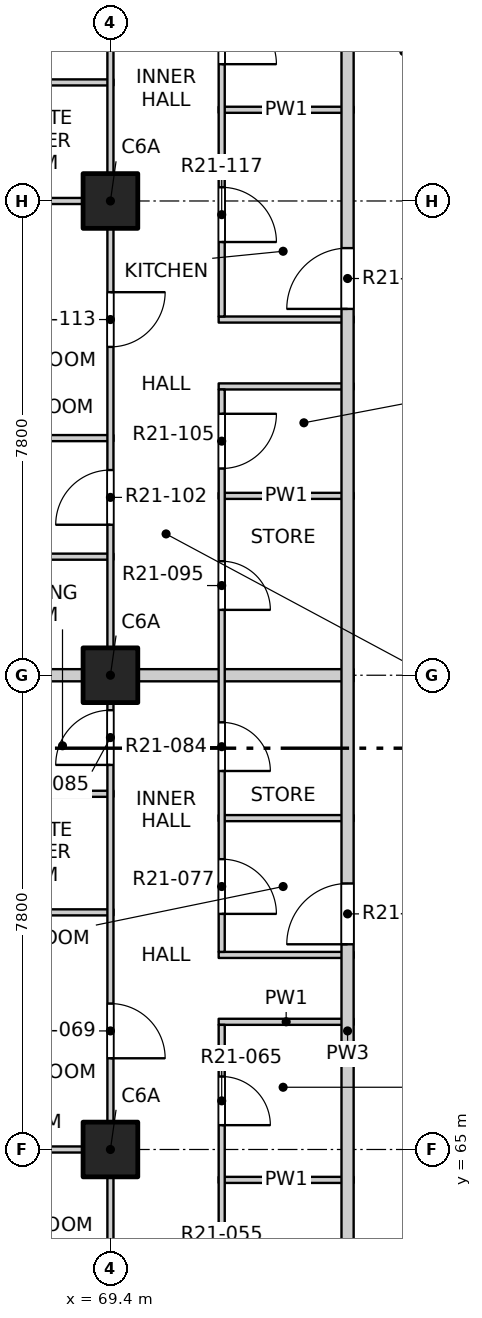
"""IFC4 building model, lengths in metres.
Left out: names, types, materials, properties, quantities, classifications, styles, units other than length and angle.
Written with IfcOpenShell. Run it as: python <this file> out.ifc"""

import sys

from ifc_helpers import new_model, si_unit, direction, frame, frame_2d, origin, origin_2d, place, context, subcontext, project, spatial, rectangle, extrude, element, fill, save


model = new_model("IFC4")
c1 = context("Model", 3, precision=1e-05, world=origin(), true_north=direction((0.0, 1.0)))
c2 = subcontext(c1, "Body", "Model", "MODEL_VIEW")
j1 = project(units=[si_unit("LENGTHUNIT", "METRE"), si_unit("PLANEANGLEUNIT", "RADIAN")], contexts=[c1])
p1 = place(None, origin())
s1 = spatial("IfcSite", under=j1, at=p1, CompositionType="ELEMENT")
p2 = place(p1, origin())
s2 = spatial("IfcBuilding", under=s1, at=p2, CompositionType="ELEMENT")
p3 = place(p2, frame((0.0, 0.0, 214.3)))
s3 = spatial("IfcBuildingStorey", under=s2, at=p3, CompositionType="ELEMENT", Elevation=214.3)
for number, where, z_axis, x_axis in (
    (1, (69.4, 65.0, -0.25), (0.0, 0.0, 1.0), (1.0, 0.0, 0.0)),
    (2, (69.4, 72.8, -0.25), (0.0, 0.0, 1.0), (1.0, 0.0, 0.0)),
    (3, (69.4, 80.6, -0.25), (0.0, 0.0, 1.0), (1.0, 0.0, 0.0)),
):
    element("IfcColumn", number, at=place(p3, frame(where, z_axis=z_axis, x_axis=x_axis)), inside=s3, PredefinedType="COLUMN", context=c2, shape_type="SweptSolid", body=[
        extrude(rectangle(XDim=0.9, YDim=0.9, at=origin_2d()), origin(), (0.0, 0.0, 1.0), 3.4),
    ])
p4 = place(p3, frame((71.18, 64.5, 0.0), z_axis=(0.0, 0.0, 1.0), x_axis=(1.0, 0.0, 0.0)))
e4 = element("IfcWall", 4, at=p4, inside=s3, PredefinedType="PARTITIONING", context=c2, shape_type="SweptSolid", body=[
    extrude(rectangle(XDim=2.22, YDim=0.1, at=frame_2d((1.11, 0.0))), origin(), (0.0, 0.0, 1.0), 3.15),
])
p5 = place(p3, frame((61.9, 65.0, 0.0), z_axis=(0.0, 0.0, 1.0), x_axis=(1.0, 0.0, 0.0)))
e5 = element("IfcWall", 5, at=p5, inside=s3, PredefinedType="PARTITIONING", context=c2, shape_type="SweptSolid", body=[
    extrude(rectangle(XDim=7.55, YDim=0.1, at=frame_2d((3.775, 0.0))), origin(), (0.0, 0.0, 1.0), 3.15),
])
for number, where, z_axis, x_axis in (
    (6, (71.18, 67.1, 0.0), (0.0, 0.0, 1.0), (1.0, 0.0, 0.0)),
    (7, (71.18, 68.2, 0.0), (0.0, 0.0, 1.0), (1.0, 0.0, 0.0)),
):
    element("IfcWall", number, at=place(p3, frame(where, z_axis=z_axis, x_axis=x_axis)), inside=s3, PredefinedType="PARTITIONING", context=c2, shape_type="SweptSolid", body=[
        extrude(rectangle(XDim=2.22, YDim=0.1, at=frame_2d((1.11, 0.0))), origin(), (0.0, 0.0, 1.0), 3.15),
    ])
p6 = place(p3, frame((61.9, 68.9, 0.0), z_axis=(0.0, 0.0, 1.0), x_axis=(1.0, 0.0, 0.0)))
e8 = element("IfcWall", 8, at=p6, inside=s3, PredefinedType="PARTITIONING", context=c2, shape_type="SweptSolid", body=[
    extrude(rectangle(XDim=7.55, YDim=0.1, at=frame_2d((3.775, 0.0))), origin(), (0.0, 0.0, 1.0), 2.55),
])
p7 = place(p3, frame((71.18, 70.45, 0.0), z_axis=(0.0, 0.0, 1.0), x_axis=(1.0, 0.0, 0.0)))
e9 = element("IfcWall", 9, at=p7, inside=s3, PredefinedType="PARTITIONING", context=c2, shape_type="SweptSolid", body=[
    extrude(rectangle(XDim=2.22, YDim=0.1, at=frame_2d((1.11, 0.0))), origin(), (0.0, 0.0, 1.0), 3.15),
])
p8 = place(p3, frame((66.05, 70.85, 0.0), z_axis=(0.0, 0.0, 1.0), x_axis=(1.0, 0.0, 0.0)))
e10 = element("IfcWall", 10, at=p8, inside=s3, PredefinedType="PARTITIONING", context=c2, shape_type="SweptSolid", body=[
    extrude(rectangle(XDim=3.4, YDim=0.1, at=frame_2d((1.7, 0.0))), origin(), (0.0, 0.0, 1.0), 3.15),
])
p9 = place(p3, frame((61.9, 72.8, 0.0), z_axis=(0.0, 0.0, 1.0), x_axis=(1.0, 0.0, 0.0)))
e11 = element("IfcWall", 11, at=p9, inside=s3, PredefinedType="PARTITIONING", context=c2, shape_type="SweptSolid", body=[
    extrude(rectangle(XDim=11.5, YDim=0.2, at=frame_2d((5.75, 0.0))), origin(), (0.0, 0.0, 1.0), 3.15),
])
p10 = place(p3, frame((66.05, 74.75, 0.0), z_axis=(0.0, 0.0, 1.0), x_axis=(1.0, 0.0, 0.0)))
e12 = element("IfcWall", 12, at=p10, inside=s3, PredefinedType="PARTITIONING", context=c2, shape_type="SweptSolid", body=[
    extrude(rectangle(XDim=3.4, YDim=0.1, at=frame_2d((1.7, 0.0))), origin(), (0.0, 0.0, 1.0), 3.15),
])
p11 = place(p3, frame((71.18, 75.75, 0.0), z_axis=(0.0, 0.0, 1.0), x_axis=(1.0, 0.0, 0.0)))
e13 = element("IfcWall", 13, at=p11, inside=s3, PredefinedType="PARTITIONING", context=c2, shape_type="SweptSolid", body=[
    extrude(rectangle(XDim=2.22, YDim=0.1, at=frame_2d((1.11, 0.0))), origin(), (0.0, 0.0, 1.0), 3.15),
])
p12 = place(p3, frame((61.9, 76.7, 0.0), z_axis=(0.0, 0.0, 1.0), x_axis=(1.0, 0.0, 0.0)))
e14 = element("IfcWall", 14, at=p12, inside=s3, PredefinedType="PARTITIONING", context=c2, shape_type="SweptSolid", body=[
    extrude(rectangle(XDim=7.55, YDim=0.1, at=frame_2d((3.775, 0.0))), origin(), (0.0, 0.0, 1.0), 2.55),
])
for number, where, z_axis, x_axis in (
    (15, (71.18, 77.55, 0.0), (0.0, 0.0, 1.0), (1.0, 0.0, 0.0)),
    (16, (71.18, 78.65, 0.0), (0.0, 0.0, 1.0), (1.0, 0.0, 0.0)),
):
    element("IfcWall", number, at=place(p3, frame(where, z_axis=z_axis, x_axis=x_axis)), inside=s3, PredefinedType="PARTITIONING", context=c2, shape_type="SweptSolid", body=[
        extrude(rectangle(XDim=2.22, YDim=0.1, at=frame_2d((1.11, 0.0))), origin(), (0.0, 0.0, 1.0), 3.15),
    ])
p13 = place(p3, frame((61.9, 80.6, 0.0), z_axis=(0.0, 0.0, 1.0), x_axis=(1.0, 0.0, 0.0)))
e17 = element("IfcWall", 17, at=p13, inside=s3, PredefinedType="PARTITIONING", context=c2, shape_type="SweptSolid", body=[
    extrude(rectangle(XDim=7.55, YDim=0.1, at=frame_2d((3.775, 0.0))), origin(), (0.0, 0.0, 1.0), 3.15),
])
p14 = place(p3, frame((71.18, 82.1, 0.0), z_axis=(0.0, 0.0, 1.0), x_axis=(1.0, 0.0, 0.0)))
e18 = element("IfcWall", 18, at=p14, inside=s3, PredefinedType="PARTITIONING", context=c2, shape_type="SweptSolid", body=[
    extrude(rectangle(XDim=2.22, YDim=0.1, at=frame_2d((1.11, 0.0))), origin(), (0.0, 0.0, 1.0), 3.15),
])
p15 = place(p3, frame((66.05, 82.55, 0.0), z_axis=(0.0, 0.0, 1.0), x_axis=(1.0, 0.0, 0.0)))
e19 = element("IfcWall", 19, at=p15, inside=s3, PredefinedType="PARTITIONING", context=c2, shape_type="SweptSolid", body=[
    extrude(rectangle(XDim=3.4, YDim=0.1, at=frame_2d((1.7, 0.0))), origin(), (0.0, 0.0, 1.0), 3.15),
])
p16 = place(p3, frame((69.4, 41.9, 0.0), z_axis=(0.0, 0.0, 1.0), x_axis=(0.0, 1.0, 0.0)))
e20 = element("IfcWall", 20, at=p16, inside=s3, PredefinedType="PARTITIONING", context=c2, shape_type="SweptSolid", body=[
    extrude(rectangle(XDim=46.2, YDim=0.1, at=frame_2d((23.1, 0.0))), origin(), (0.0, 0.0, 1.0), 3.15),
])
p17 = place(p16, frame((1.2, 0.0, 0.0)))
e21 = element("IfcOpeningElement", 21, at=p17, cuts=e20, PredefinedType="OPENING", context=c2, shape_type="SweptSolid", body=[
    extrude(rectangle(XDim=0.9, YDim=2.1, at=frame_2d((0.45, 1.05))), frame((0.0, 0.06, 0.0), z_axis=(0.0, -1.0, 0.0), x_axis=(1.0, 0.0, 0.0)), (0.0, 0.0, 1.0), 0.12),
])
p18 = place(p16, frame((6.025, 0.0, 0.0)))
e22 = element("IfcOpeningElement", 22, at=p18, cuts=e20, PredefinedType="OPENING", context=c2, shape_type="SweptSolid", body=[
    extrude(rectangle(XDim=0.9, YDim=2.1, at=frame_2d((0.45, 1.05))), frame((0.0, 0.06, 0.0), z_axis=(0.0, -1.0, 0.0), x_axis=(1.0, 0.0, 0.0)), (0.0, 0.0, 1.0), 0.12),
])
p19 = place(p16, frame((9.0, 0.0, 0.0)))
e23 = element("IfcOpeningElement", 23, at=p19, cuts=e20, PredefinedType="OPENING", context=c2, shape_type="SweptSolid", body=[
    extrude(rectangle(XDim=0.9, YDim=2.1, at=frame_2d((0.45, 1.05))), frame((0.0, 0.06, 0.0), z_axis=(0.0, -1.0, 0.0), x_axis=(1.0, 0.0, 0.0)), (0.0, 0.0, 1.0), 0.12),
])
p20 = place(p16, frame((12.9, 0.0, 0.0)))
e24 = element("IfcOpeningElement", 24, at=p20, cuts=e20, PredefinedType="OPENING", context=c2, shape_type="SweptSolid", body=[
    extrude(rectangle(XDim=0.9, YDim=2.1, at=frame_2d((0.45, 1.05))), frame((0.0, 0.06, 0.0), z_axis=(0.0, -1.0, 0.0), x_axis=(1.0, 0.0, 0.0)), (0.0, 0.0, 1.0), 0.12),
])
p21 = place(p16, frame((17.775, 0.0, 0.0)))
e25 = element("IfcOpeningElement", 25, at=p21, cuts=e20, PredefinedType="OPENING", context=c2, shape_type="SweptSolid", body=[
    extrude(rectangle(XDim=0.9, YDim=2.1, at=frame_2d((0.45, 1.05))), frame((0.0, 0.06, 0.0), z_axis=(0.0, -1.0, 0.0), x_axis=(1.0, 0.0, 0.0)), (0.0, 0.0, 1.0), 0.12),
])
p22 = place(p16, frame((20.7, 0.0, 0.0)))
e26 = element("IfcOpeningElement", 26, at=p22, cuts=e20, PredefinedType="OPENING", context=c2, shape_type="SweptSolid", body=[
    extrude(rectangle(XDim=0.9, YDim=2.1, at=frame_2d((0.45, 1.05))), frame((0.0, 0.06, 0.0), z_axis=(0.0, -1.0, 0.0), x_axis=(1.0, 0.0, 0.0)), (0.0, 0.0, 1.0), 0.12),
])
p23 = place(p16, frame((24.6, 0.0, 0.0)))
e27 = element("IfcOpeningElement", 27, at=p23, cuts=e20, PredefinedType="OPENING", context=c2, shape_type="SweptSolid", body=[
    extrude(rectangle(XDim=0.9, YDim=2.1, at=frame_2d((0.45, 1.05))), frame((0.0, 0.06, 0.0), z_axis=(0.0, -1.0, 0.0), x_axis=(1.0, 0.0, 0.0)), (0.0, 0.0, 1.0), 0.12),
])
p24 = place(p16, frame((29.425, 0.0, 0.0)))
e28 = element("IfcOpeningElement", 28, at=p24, cuts=e20, PredefinedType="OPENING", context=c2, shape_type="SweptSolid", body=[
    extrude(rectangle(XDim=0.9, YDim=2.1, at=frame_2d((0.45, 1.05))), frame((0.0, 0.06, 0.0), z_axis=(0.0, -1.0, 0.0), x_axis=(1.0, 0.0, 0.0)), (0.0, 0.0, 1.0), 0.12),
])
p25 = place(p16, frame((33.375, 0.0, 0.0)))
e29 = element("IfcOpeningElement", 29, at=p25, cuts=e20, PredefinedType="OPENING", context=c2, shape_type="SweptSolid", body=[
    extrude(rectangle(XDim=0.9, YDim=2.1, at=frame_2d((0.45, 1.05))), frame((0.0, 0.06, 0.0), z_axis=(0.0, -1.0, 0.0), x_axis=(1.0, 0.0, 0.0)), (0.0, 0.0, 1.0), 0.12),
])
p26 = place(p16, frame((36.3, 0.0, 0.0)))
e30 = element("IfcOpeningElement", 30, at=p26, cuts=e20, PredefinedType="OPENING", context=c2, shape_type="SweptSolid", body=[
    extrude(rectangle(XDim=0.9, YDim=2.1, at=frame_2d((0.45, 1.05))), frame((0.0, 0.06, 0.0), z_axis=(0.0, -1.0, 0.0), x_axis=(1.0, 0.0, 0.0)), (0.0, 0.0, 1.0), 0.12),
])
p27 = place(p16, frame((41.175, 0.0, 0.0)))
e31 = element("IfcOpeningElement", 31, at=p27, cuts=e20, PredefinedType="OPENING", context=c2, shape_type="SweptSolid", body=[
    extrude(rectangle(XDim=0.9, YDim=2.1, at=frame_2d((0.45, 1.05))), frame((0.0, 0.06, 0.0), z_axis=(0.0, -1.0, 0.0), x_axis=(1.0, 0.0, 0.0)), (0.0, 0.0, 1.0), 0.12),
])
p28 = place(p16, frame((44.1, 0.0, 0.0)))
e32 = element("IfcOpeningElement", 32, at=p28, cuts=e20, PredefinedType="OPENING", context=c2, shape_type="SweptSolid", body=[
    extrude(rectangle(XDim=0.9, YDim=2.1, at=frame_2d((0.45, 1.05))), frame((0.0, 0.06, 0.0), z_axis=(0.0, -1.0, 0.0), x_axis=(1.0, 0.0, 0.0)), (0.0, 0.0, 1.0), 0.12),
])
p29 = place(p3, frame((71.23, 55.15, 0.0), z_axis=(0.0, 0.0, 1.0), x_axis=(0.0, 1.0, 0.0)))
e33 = element("IfcWall", 33, at=p29, inside=s3, PredefinedType="PARTITIONING", context=c2, shape_type="SweptSolid", body=[
    extrude(rectangle(XDim=11.9, YDim=0.1, at=frame_2d((5.95, 0.0))), origin(), (0.0, 0.0, 1.0), 3.15),
])
p30 = place(p29, frame((0.4, 0.0, 0.0)))
e34 = element("IfcOpeningElement", 34, at=p30, cuts=e33, PredefinedType="OPENING", context=c2, shape_type="SweptSolid", body=[
    extrude(rectangle(XDim=0.9, YDim=2.1, at=frame_2d((0.45, 1.05))), frame((0.0, 0.06, 0.0), z_axis=(0.0, -1.0, 0.0), x_axis=(1.0, 0.0, 0.0)), (0.0, 0.0, 1.0), 0.12),
])
p31 = place(p29, frame((2.4, 0.0, 0.0)))
e35 = element("IfcOpeningElement", 35, at=p31, cuts=e33, PredefinedType="OPENING", context=c2, shape_type="SweptSolid", body=[
    extrude(rectangle(XDim=0.8, YDim=2.1, at=frame_2d((0.4, 1.05))), frame((0.0, 0.06, 0.0), z_axis=(0.0, -1.0, 0.0), x_axis=(1.0, 0.0, 0.0)), (0.0, 0.0, 1.0), 0.12),
])
p32 = place(p29, frame((4.45, 0.0, 0.0)))
e36 = element("IfcOpeningElement", 36, at=p32, cuts=e33, PredefinedType="OPENING", context=c2, shape_type="SweptSolid", body=[
    extrude(rectangle(XDim=0.9, YDim=2.1, at=frame_2d((0.45, 1.05))), frame((0.0, 0.06, 0.0), z_axis=(0.0, -1.0, 0.0), x_axis=(1.0, 0.0, 0.0)), (0.0, 0.0, 1.0), 0.12),
])
p33 = place(p29, frame((7.2, 0.0, 0.0)))
e37 = element("IfcOpeningElement", 37, at=p33, cuts=e33, PredefinedType="OPENING", context=c2, shape_type="SweptSolid", body=[
    extrude(rectangle(XDim=0.9, YDim=2.1, at=frame_2d((0.45, 1.05))), frame((0.0, 0.06, 0.0), z_axis=(0.0, -1.0, 0.0), x_axis=(1.0, 0.0, 0.0)), (0.0, 0.0, 1.0), 0.12),
])
p34 = place(p29, frame((10.25, 0.0, 0.0)))
e38 = element("IfcOpeningElement", 38, at=p34, cuts=e33, PredefinedType="OPENING", context=c2, shape_type="SweptSolid", body=[
    extrude(rectangle(XDim=0.8, YDim=2.1, at=frame_2d((0.4, 1.05))), frame((0.0, 0.06, 0.0), z_axis=(0.0, -1.0, 0.0), x_axis=(1.0, 0.0, 0.0)), (0.0, 0.0, 1.0), 0.12),
])
p35 = place(p3, frame((71.23, 68.25, 0.0), z_axis=(0.0, 0.0, 1.0), x_axis=(0.0, 1.0, 0.0)))
e39 = element("IfcWall", 39, at=p35, inside=s3, PredefinedType="PARTITIONING", context=c2, shape_type="SweptSolid", body=[
    extrude(rectangle(XDim=9.25, YDim=0.1, at=frame_2d((4.625, 0.0))), origin(), (0.0, 0.0, 1.0), 3.15),
])
p36 = place(p35, frame((0.625, 0.0, 0.0)))
e40 = element("IfcOpeningElement", 40, at=p36, cuts=e39, PredefinedType="OPENING", context=c2, shape_type="SweptSolid", body=[
    extrude(rectangle(XDim=0.9, YDim=2.1, at=frame_2d((0.45, 1.05))), frame((0.0, 0.06, 0.0), z_axis=(0.0, -1.0, 0.0), x_axis=(1.0, 0.0, 0.0)), (0.0, 0.0, 1.0), 0.12),
])
p37 = place(p35, frame((2.975, 0.0, 0.0)))
e41 = element("IfcOpeningElement", 41, at=p37, cuts=e39, PredefinedType="OPENING", context=c2, shape_type="SweptSolid", body=[
    extrude(rectangle(XDim=0.8, YDim=2.1, at=frame_2d((0.4, 1.05))), frame((0.0, 0.06, 0.0), z_axis=(0.0, -1.0, 0.0), x_axis=(1.0, 0.0, 0.0)), (0.0, 0.0, 1.0), 0.12),
])
p38 = place(p35, frame((5.625, 0.0, 0.0)))
e42 = element("IfcOpeningElement", 42, at=p38, cuts=e39, PredefinedType="OPENING", context=c2, shape_type="SweptSolid", body=[
    extrude(rectangle(XDim=0.8, YDim=2.1, at=frame_2d((0.4, 1.05))), frame((0.0, 0.06, 0.0), z_axis=(0.0, -1.0, 0.0), x_axis=(1.0, 0.0, 0.0)), (0.0, 0.0, 1.0), 0.12),
])
p39 = place(p35, frame((7.95, 0.0, 0.0)))
e43 = element("IfcOpeningElement", 43, at=p39, cuts=e39, PredefinedType="OPENING", context=c2, shape_type="SweptSolid", body=[
    extrude(rectangle(XDim=0.9, YDim=2.1, at=frame_2d((0.45, 1.05))), frame((0.0, 0.06, 0.0), z_axis=(0.0, -1.0, 0.0), x_axis=(1.0, 0.0, 0.0)), (0.0, 0.0, 1.0), 0.12),
])
p40 = place(p3, frame((71.23, 78.7, 0.0), z_axis=(0.0, 0.0, 1.0), x_axis=(0.0, 1.0, 0.0)))
e44 = element("IfcWall", 44, at=p40, inside=s3, PredefinedType="PARTITIONING", context=c2, shape_type="SweptSolid", body=[
    extrude(rectangle(XDim=5.75, YDim=0.1, at=frame_2d((2.875, 0.0))), origin(), (0.0, 0.0, 1.0), 3.15),
])
p41 = place(p40, frame((1.225, 0.0, 0.0)))
e45 = element("IfcOpeningElement", 45, at=p41, cuts=e44, PredefinedType="OPENING", context=c2, shape_type="SweptSolid", body=[
    extrude(rectangle(XDim=0.9, YDim=2.1, at=frame_2d((0.45, 1.05))), frame((0.0, 0.06, 0.0), z_axis=(0.0, -1.0, 0.0), x_axis=(1.0, 0.0, 0.0)), (0.0, 0.0, 1.0), 0.12),
])
p42 = place(p40, frame((4.15, 0.0, 0.0)))
e46 = element("IfcOpeningElement", 46, at=p42, cuts=e44, PredefinedType="OPENING", context=c2, shape_type="SweptSolid", body=[
    extrude(rectangle(XDim=0.9, YDim=2.1, at=frame_2d((0.45, 1.05))), frame((0.0, 0.06, 0.0), z_axis=(0.0, -1.0, 0.0), x_axis=(1.0, 0.0, 0.0)), (0.0, 0.0, 1.0), 0.12),
])
p43 = place(p3, frame((73.3, 49.5, 0.0), z_axis=(0.0, 0.0, 1.0), x_axis=(0.0, 1.0, 0.0)))
e47 = element("IfcWall", 47, at=p43, inside=s3, PredefinedType="PARTITIONING", context=c2, shape_type="SweptSolid", body=[
    extrude(rectangle(XDim=34.9, YDim=0.2, at=frame_2d((17.45, 0.0))), origin(), (0.0, 0.0, 1.0), 3.15),
])
p44 = place(p43, frame((3.325, 0.0, 0.0)))
e48 = element("IfcOpeningElement", 48, at=p44, cuts=e47, PredefinedType="OPENING", context=c2, shape_type="SweptSolid", body=[
    extrude(rectangle(XDim=1.0, YDim=2.1, at=frame_2d((0.5, 1.05))), frame((0.0, 0.11, 0.0), z_axis=(0.0, -1.0, 0.0), x_axis=(1.0, 0.0, 0.0)), (0.0, 0.0, 1.0), 0.22),
])
p45 = place(p43, frame((18.875, 0.0, 0.0)))
e49 = element("IfcOpeningElement", 49, at=p45, cuts=e47, PredefinedType="OPENING", context=c2, shape_type="SweptSolid", body=[
    extrude(rectangle(XDim=1.0, YDim=2.1, at=frame_2d((0.5, 1.05))), frame((0.0, 0.11, 0.0), z_axis=(0.0, -1.0, 0.0), x_axis=(1.0, 0.0, 0.0)), (0.0, 0.0, 1.0), 0.22),
])
p46 = place(p43, frame((29.325, 0.0, 0.0)))
e50 = element("IfcOpeningElement", 50, at=p46, cuts=e47, PredefinedType="OPENING", context=c2, shape_type="SweptSolid", body=[
    extrude(rectangle(XDim=1.0, YDim=2.1, at=frame_2d((0.5, 1.05))), frame((0.0, 0.11, 0.0), z_axis=(0.0, -1.0, 0.0), x_axis=(1.0, 0.0, 0.0)), (0.0, 0.0, 1.0), 0.22),
])
p47 = place(p34, origin())
e51 = element("IfcDoor", 51, at=p47, inside=s3, OperationType="SINGLE_SWING_RIGHT", PredefinedType="DOOR", context=c2, shape_type="SweptSolid", body=[
    extrude(rectangle(XDim=0.8, YDim=2.1, at=frame_2d((0.4, 1.05))), frame((0.0, 0.025, 0.0), z_axis=(0.0, -1.0, 0.0), x_axis=(1.0, 0.0, 0.0)), (0.0, 0.0, 1.0), 0.05),
])
fill(e38, e51)
p48 = place(p23, origin())
e52 = element("IfcDoor", 52, at=p48, inside=s3, OperationType="SINGLE_SWING_RIGHT", PredefinedType="DOOR", context=c2, shape_type="SweptSolid", body=[
    extrude(rectangle(XDim=0.9, YDim=2.1, at=frame_2d((0.45, 1.05))), frame((0.0, 0.025, 0.0), z_axis=(0.0, -1.0, 0.0), x_axis=(1.0, 0.0, 0.0)), (0.0, 0.0, 1.0), 0.05),
])
fill(e27, e52)
p49 = place(p45, origin())
e53 = element("IfcDoor", 53, at=p49, inside=s3, OperationType="SINGLE_SWING_RIGHT", PredefinedType="DOOR", context=c2, shape_type="SweptSolid", body=[
    extrude(rectangle(XDim=1.0, YDim=2.1, at=frame_2d((0.5, 1.05))), frame((0.0, 0.025, 0.0), z_axis=(0.0, -1.0, 0.0), x_axis=(1.0, 0.0, 0.0)), (0.0, 0.0, 1.0), 0.05),
])
fill(e49, e53)
p50 = place(p36, origin())
e54 = element("IfcDoor", 54, at=p50, inside=s3, OperationType="SINGLE_SWING_RIGHT", PredefinedType="DOOR", context=c2, shape_type="SweptSolid", body=[
    extrude(rectangle(XDim=0.9, YDim=2.1, at=frame_2d((0.45, 1.05))), frame((0.0, 0.025, 0.0), z_axis=(0.0, -1.0, 0.0), x_axis=(1.0, 0.0, 0.0)), (0.0, 0.0, 1.0), 0.05),
])
fill(e40, e54)
p51 = place(p37, origin())
e55 = element("IfcDoor", 55, at=p51, inside=s3, OperationType="SINGLE_SWING_RIGHT", PredefinedType="DOOR", context=c2, shape_type="SweptSolid", body=[
    extrude(rectangle(XDim=0.8, YDim=2.1, at=frame_2d((0.4, 1.05))), frame((0.0, 0.025, 0.0), z_axis=(0.0, -1.0, 0.0), x_axis=(1.0, 0.0, 0.0)), (0.0, 0.0, 1.0), 0.05),
])
fill(e41, e55)
p52 = place(p24, origin())
e56 = element("IfcDoor", 56, at=p52, inside=s3, OperationType="SINGLE_SWING_LEFT", PredefinedType="DOOR", context=c2, shape_type="SweptSolid", body=[
    extrude(rectangle(XDim=0.9, YDim=2.1, at=frame_2d((0.45, 1.05))), frame((0.0, 0.025, 0.0), z_axis=(0.0, -1.0, 0.0), x_axis=(1.0, 0.0, 0.0)), (0.0, 0.0, 1.0), 0.05),
])
fill(e28, e56)
p53 = place(p38, origin())
e57 = element("IfcDoor", 57, at=p53, inside=s3, OperationType="SINGLE_SWING_RIGHT", PredefinedType="DOOR", context=c2, shape_type="SweptSolid", body=[
    extrude(rectangle(XDim=0.8, YDim=2.1, at=frame_2d((0.4, 1.05))), frame((0.0, 0.025, 0.0), z_axis=(0.0, -1.0, 0.0), x_axis=(1.0, 0.0, 0.0)), (0.0, 0.0, 1.0), 0.05),
])
fill(e42, e57)
p54 = place(p25, origin())
e58 = element("IfcDoor", 58, at=p54, inside=s3, OperationType="SINGLE_SWING_LEFT", PredefinedType="DOOR", context=c2, shape_type="SweptSolid", body=[
    extrude(rectangle(XDim=0.9, YDim=2.1, at=frame_2d((0.45, 1.05))), frame((0.0, 0.025, 0.0), z_axis=(0.0, -1.0, 0.0), x_axis=(1.0, 0.0, 0.0)), (0.0, 0.0, 1.0), 0.05),
])
fill(e29, e58)
p55 = place(p39, origin())
e59 = element("IfcDoor", 59, at=p55, inside=s3, OperationType="SINGLE_SWING_LEFT", PredefinedType="DOOR", context=c2, shape_type="SweptSolid", body=[
    extrude(rectangle(XDim=0.9, YDim=2.1, at=frame_2d((0.45, 1.05))), frame((0.0, 0.025, 0.0), z_axis=(0.0, -1.0, 0.0), x_axis=(1.0, 0.0, 0.0)), (0.0, 0.0, 1.0), 0.05),
])
fill(e43, e59)
p56 = place(p26, origin())
e60 = element("IfcDoor", 60, at=p56, inside=s3, OperationType="SINGLE_SWING_LEFT", PredefinedType="DOOR", context=c2, shape_type="SweptSolid", body=[
    extrude(rectangle(XDim=0.9, YDim=2.1, at=frame_2d((0.45, 1.05))), frame((0.0, 0.025, 0.0), z_axis=(0.0, -1.0, 0.0), x_axis=(1.0, 0.0, 0.0)), (0.0, 0.0, 1.0), 0.05),
])
fill(e30, e60)
p57 = place(p46, origin())
e61 = element("IfcDoor", 61, at=p57, inside=s3, OperationType="SINGLE_SWING_RIGHT", PredefinedType="DOOR", context=c2, shape_type="SweptSolid", body=[
    extrude(rectangle(XDim=1.0, YDim=2.1, at=frame_2d((0.5, 1.05))), frame((0.0, 0.025, 0.0), z_axis=(0.0, -1.0, 0.0), x_axis=(1.0, 0.0, 0.0)), (0.0, 0.0, 1.0), 0.05),
])
fill(e50, e61)
p58 = place(p41, origin())
e62 = element("IfcDoor", 62, at=p58, inside=s3, OperationType="SINGLE_SWING_RIGHT", PredefinedType="DOOR", context=c2, shape_type="SweptSolid", body=[
    extrude(rectangle(XDim=0.9, YDim=2.1, at=frame_2d((0.45, 1.05))), frame((0.0, 0.025, 0.0), z_axis=(0.0, -1.0, 0.0), x_axis=(1.0, 0.0, 0.0)), (0.0, 0.0, 1.0), 0.05),
])
fill(e45, e62)
p59 = place(p42, origin())
e63 = element("IfcDoor", 63, at=p59, inside=s3, OperationType="SINGLE_SWING_RIGHT", PredefinedType="DOOR", context=c2, shape_type="SweptSolid", body=[
    extrude(rectangle(XDim=0.9, YDim=2.1, at=frame_2d((0.45, 1.05))), frame((0.0, 0.025, 0.0), z_axis=(0.0, -1.0, 0.0), x_axis=(1.0, 0.0, 0.0)), (0.0, 0.0, 1.0), 0.05),
])
fill(e46, e63)
save(model, sys.argv[1])
